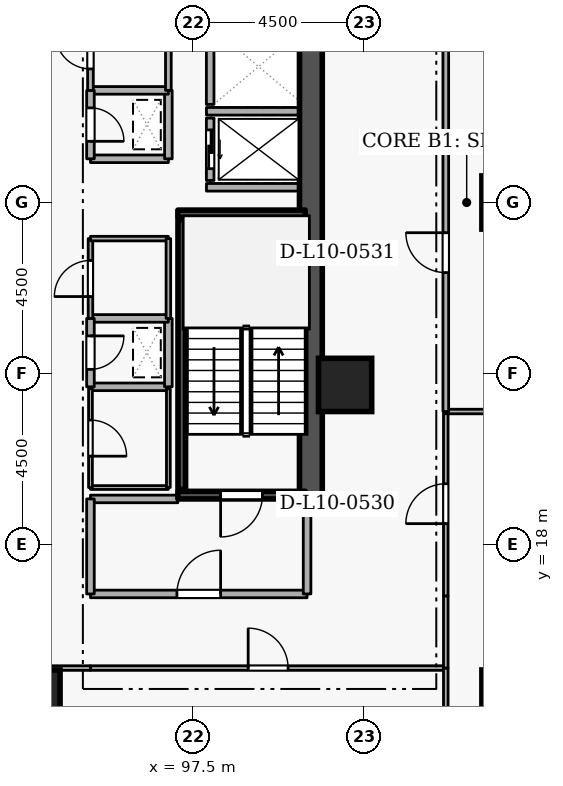
"""IFC4 building model, lengths in metres.
Left out: names, types, materials, properties, quantities, classifications, styles, units other than length and angle.
Written with IfcOpenShell. Run it as: python <this file> out.ifc"""

import sys

from ifc_helpers import new_model, si_unit, direction, frame, frame_2d, origin, origin_2d, place, context, subcontext, project, spatial, rectangle, extrude, element, fill, save


model = new_model("IFC4")
c1 = context("Model", 3, precision=1e-05, world=origin(), true_north=direction((0.0, 1.0)))
c2 = subcontext(c1, "Body", "Model", "MODEL_VIEW")
j1 = project(units=[si_unit("LENGTHUNIT", "METRE"), si_unit("PLANEANGLEUNIT", "RADIAN")], contexts=[c1])
p1 = place(None, origin())
s1 = spatial("IfcSite", under=j1, at=p1, CompositionType="ELEMENT")
p2 = place(p1, origin())
s2 = spatial("IfcBuilding", under=s1, at=p2, CompositionType="ELEMENT")
p3 = place(p2, frame((0.0, 0.0, 42.3)))
s3 = spatial("IfcBuildingStorey", under=s2, at=p3, CompositionType="ELEMENT", Elevation=42.3)
p4 = place(p3, frame((100.6, 19.2, 0.0), z_axis=(0.0, 0.0, 1.0), x_axis=(0.0, 1.0, 0.0)))
e1 = element("IfcWall", 1, at=p4, inside=s3, PredefinedType="SHEAR", context=c2, shape_type="SweptSolid", body=[
    extrude(rectangle(XDim=15.6, YDim=0.6, at=frame_2d((7.8, 0.0))), origin(), (0.0, 0.0, 1.0), 3.6),
])
for number, where, z_axis, x_axis in (
    (2, (105.8, 14.0, 0.0), (0.0, 0.0, 1.0), (1.0, 0.0, 0.0)),
    (3, (105.8, 27.0, 0.0), (0.0, 0.0, 1.0), (1.0, 0.0, 0.0)),
    (4, (93.3, 14.0, 0.0), (0.0, 0.0, 1.0), (1.0, 0.0, 0.0)),
    (5, (101.5, 22.2, 0.0), (0.0, 0.0, 1.0), (1.0, 0.0, 0.0)),
):
    element("IfcColumn", number, at=place(p3, frame(where, z_axis=z_axis, x_axis=x_axis)), inside=s3, PredefinedType="COLUMN", context=c2, shape_type="SweptSolid", body=[
        extrude(rectangle(XDim=1.4, YDim=1.4, at=origin_2d()), origin(), (0.0, 0.0, 1.0), 3.6),
    ])
p5 = place(p3, frame((97.95, 29.22, 0.0), z_axis=(0.0, 0.0, 1.0), x_axis=(0.0, -1.0, 0.0)))
e6 = element("IfcWall", 6, at=p5, inside=s3, PredefinedType="STANDARD", context=c2, shape_type="SweptSolid", body=[
    extrude(rectangle(XDim=1.64, YDim=0.2, at=frame_2d((0.82, 0.0))), origin(), (0.0, 0.0, 1.0), 3.34),
])
p6 = place(p5, frame((0.31, 0.0, 0.0)))
e7 = element("IfcOpeningElement", 7, at=p6, cuts=e6, PredefinedType="OPENING", context=c2, shape_type="SweptSolid", body=[
    extrude(rectangle(XDim=1.02, YDim=2.06, at=frame_2d((0.51, 1.03))), frame((0.0, 0.11, 0.0), z_axis=(0.0, -1.0, 0.0), x_axis=(1.0, 0.0, 0.0)), (0.0, 0.0, 1.0), 0.22),
])
p7 = place(p3, frame((97.95, 31.57, 0.0), z_axis=(0.0, 0.0, 1.0), x_axis=(0.0, -1.0, 0.0)))
e8 = element("IfcWall", 8, at=p7, inside=s3, PredefinedType="STANDARD", context=c2, shape_type="SweptSolid", body=[
    extrude(rectangle(XDim=1.99, YDim=0.2, at=frame_2d((0.995, 0.0))), origin(), (0.0, 0.0, 1.0), 3.34),
])
for number, where, z_axis, x_axis in (
    (9, (97.852, 29.4, 0.0), (0.0, 0.0, 1.0), (1.0, 0.0, 0.0)),
    (10, (97.852, 27.4, 0.0), (0.0, 0.0, 1.0), (1.0, 0.0, 0.0)),
):
    element("IfcWall", number, at=place(p3, frame(where, z_axis=z_axis, x_axis=x_axis)), inside=s3, PredefinedType="STANDARD", context=c2, shape_type="SweptSolid", body=[
        extrude(rectangle(XDim=2.436, YDim=0.2, at=frame_2d((1.218, 0.0))), origin(), (0.0, 0.0, 1.0), 3.34),
    ])
p8 = place(p3, frame((100.45, 19.3, 0.0), z_axis=(0.0, 0.0, 1.0), x_axis=(-1.0, 0.0, 0.0)))
e11 = element("IfcWall", 11, at=p8, inside=s3, PredefinedType="SHEAR", context=c2, shape_type="SweptSolid", body=[
    extrude(rectangle(XDim=3.35, YDim=0.2, at=frame_2d((1.675, 0.0))), origin(), (0.0, 0.0, 1.0), 3.6),
])
p9 = place(p8, frame((1.125, 0.0, 0.0)))
e12 = element("IfcOpeningElement", 12, at=p9, cuts=e11, PredefinedType="OPENING", context=c2, shape_type="SweptSolid", body=[
    extrude(rectangle(XDim=1.1, YDim=2.1, at=frame_2d((0.55, 1.05))), frame((0.0, 0.11, 0.0), z_axis=(0.0, -1.0, 0.0), x_axis=(1.0, 0.0, 0.0)), (0.0, 0.0, 1.0), 0.22),
])
p10 = place(p3, frame((97.1, 26.7, 0.0), z_axis=(0.0, 0.0, 1.0), x_axis=(1.0, 0.0, 0.0)))
e13 = element("IfcWall", 13, at=p10, inside=s3, PredefinedType="SHEAR", context=c2, shape_type="SweptSolid", body=[
    extrude(rectangle(XDim=3.35, YDim=0.2, at=frame_2d((1.675, 0.0))), origin(), (0.0, 0.0, 1.0), 3.6),
])
p11 = place(p3, frame((97.203, 26.55, 0.0), z_axis=(0.0, 0.0, 1.0), x_axis=(0.0, -1.0, 0.0)))
e14 = element("IfcWall", 14, at=p11, inside=s3, PredefinedType="SHEAR", context=c2, shape_type="SweptSolid", body=[
    extrude(rectangle(XDim=7.1, YDim=0.2, at=frame_2d((3.55, 0.0))), origin(), (0.0, 0.0, 1.0), 3.6),
])
p12 = place(p3, frame((94.8, 16.7, 0.0), z_axis=(0.0, 0.0, 1.0), x_axis=(1.0, 0.0, 0.0)))
e15 = element("IfcWall", 15, at=p12, inside=s3, PredefinedType="STANDARD", context=c2, shape_type="SweptSolid", body=[
    extrude(rectangle(XDim=5.7, YDim=0.2, at=frame_2d((2.85, 0.0))), origin(), (0.0, 0.0, 1.0), 3.34),
])
p13 = place(p12, frame((2.275, 0.0, 0.0)))
e16 = element("IfcOpeningElement", 16, at=p13, cuts=e15, PredefinedType="OPENING", context=c2, shape_type="SweptSolid", body=[
    extrude(rectangle(XDim=1.15, YDim=2.1, at=frame_2d((0.575, 1.05))), frame((0.0, 0.11, 0.0), z_axis=(0.0, -1.0, 0.0), x_axis=(1.0, 0.0, 0.0)), (0.0, 0.0, 1.0), 0.22),
])
p14 = place(p3, frame((100.5, 16.7, 0.0), z_axis=(0.0, 0.0, 1.0), x_axis=(0.0, 1.0, 0.0)))
e17 = element("IfcWall", 17, at=p14, inside=s3, PredefinedType="STANDARD", context=c2, shape_type="SweptSolid", body=[
    extrude(rectangle(XDim=2.5, YDim=0.2, at=frame_2d((1.25, 0.0))), origin(), (0.0, 0.0, 1.0), 3.34),
])
p15 = place(p3, frame((97.1, 19.2, 0.0), z_axis=(0.0, 0.0, 1.0), x_axis=(-1.0, 0.0, 0.0)))
e18 = element("IfcWall", 18, at=p15, inside=s3, PredefinedType="STANDARD", context=c2, shape_type="SweptSolid", body=[
    extrude(rectangle(XDim=2.3, YDim=0.2, at=frame_2d((1.15, 0.0))), origin(), (0.0, 0.0, 1.0), 2.545),
])
p16 = place(p3, frame((94.8, 19.2, 0.0), z_axis=(0.0, 0.0, 1.0), x_axis=(0.0, -1.0, 0.0)))
e19 = element("IfcWall", 19, at=p16, inside=s3, PredefinedType="STANDARD", context=c2, shape_type="SweptSolid", body=[
    extrude(rectangle(XDim=2.5, YDim=0.2, at=frame_2d((1.25, 0.0))), origin(), (0.0, 0.0, 1.0), 3.34),
])
p17 = place(p3, frame((94.8, 28.15, 0.0), z_axis=(0.0, 0.0, 1.0), x_axis=(1.0, 0.0, 0.0)))
e20 = element("IfcWall", 20, at=p17, inside=s3, PredefinedType="STANDARD", context=c2, shape_type="SweptSolid", body=[
    extrude(rectangle(XDim=2.05, YDim=0.2, at=frame_2d((1.025, 0.0))), origin(), (0.0, 0.0, 1.0), 3.34),
])
p18 = place(p3, frame((96.85, 28.15, 0.0), z_axis=(0.0, 0.0, 1.0), x_axis=(0.0, 1.0, 0.0)))
e21 = element("IfcWall", 21, at=p18, inside=s3, PredefinedType="STANDARD", context=c2, shape_type="SweptSolid", body=[
    extrude(rectangle(XDim=1.8, YDim=0.2, at=frame_2d((0.9, 0.0))), origin(), (0.0, 0.0, 1.0), 3.34),
])
p19 = place(p3, frame((96.85, 29.95, 0.0), z_axis=(0.0, 0.0, 1.0), x_axis=(-1.0, 0.0, 0.0)))
e22 = element("IfcWall", 22, at=p19, inside=s3, PredefinedType="STANDARD", context=c2, shape_type="SweptSolid", body=[
    extrude(rectangle(XDim=2.05, YDim=0.2, at=frame_2d((1.025, 0.0))), origin(), (0.0, 0.0, 1.0), 3.34),
])
p20 = place(p3, frame((94.8, 29.95, 0.0), z_axis=(0.0, 0.0, 1.0), x_axis=(0.0, -1.0, 0.0)))
e23 = element("IfcWall", 23, at=p20, inside=s3, PredefinedType="STANDARD", context=c2, shape_type="SweptSolid", body=[
    extrude(rectangle(XDim=1.8, YDim=0.2, at=frame_2d((0.9, 0.0))), origin(), (0.0, 0.0, 1.0), 3.34),
])
p21 = place(p20, frame((0.46, 0.0, 0.0)))
e24 = element("IfcOpeningElement", 24, at=p21, cuts=e23, PredefinedType="OPENING", context=c2, shape_type="SweptSolid", body=[
    extrude(rectangle(XDim=0.88, YDim=2.04, at=frame_2d((0.44, 1.02))), frame((0.0, 0.11, 0.0), z_axis=(0.0, -1.0, 0.0), x_axis=(1.0, 0.0, 0.0)), (0.0, 0.0, 1.0), 0.22),
])
p22 = place(p3, frame((94.8, 22.15, 0.0), z_axis=(0.0, 0.0, 1.0), x_axis=(1.0, 0.0, 0.0)))
e25 = element("IfcWall", 25, at=p22, inside=s3, PredefinedType="STANDARD", context=c2, shape_type="SweptSolid", body=[
    extrude(rectangle(XDim=2.05, YDim=0.2, at=frame_2d((1.025, 0.0))), origin(), (0.0, 0.0, 1.0), 3.34),
])
p23 = place(p3, frame((96.85, 22.15, 0.0), z_axis=(0.0, 0.0, 1.0), x_axis=(0.0, 1.0, 0.0)))
e26 = element("IfcWall", 26, at=p23, inside=s3, PredefinedType="STANDARD", context=c2, shape_type="SweptSolid", body=[
    extrude(rectangle(XDim=1.8, YDim=0.2, at=frame_2d((0.9, 0.0))), origin(), (0.0, 0.0, 1.0), 3.34),
])
p24 = place(p3, frame((96.85, 23.95, 0.0), z_axis=(0.0, 0.0, 1.0), x_axis=(-1.0, 0.0, 0.0)))
e27 = element("IfcWall", 27, at=p24, inside=s3, PredefinedType="STANDARD", context=c2, shape_type="SweptSolid", body=[
    extrude(rectangle(XDim=2.05, YDim=0.2, at=frame_2d((1.025, 0.0))), origin(), (0.0, 0.0, 1.0), 3.34),
])
p25 = place(p3, frame((94.8, 23.95, 0.0), z_axis=(0.0, 0.0, 1.0), x_axis=(0.0, -1.0, 0.0)))
e28 = element("IfcWall", 28, at=p25, inside=s3, PredefinedType="STANDARD", context=c2, shape_type="SweptSolid", body=[
    extrude(rectangle(XDim=1.8, YDim=0.2, at=frame_2d((0.9, 0.0))), origin(), (0.0, 0.0, 1.0), 3.34),
])
p26 = place(p25, frame((0.46, 0.0, 0.0)))
e29 = element("IfcOpeningElement", 29, at=p26, cuts=e28, PredefinedType="OPENING", context=c2, shape_type="SweptSolid", body=[
    extrude(rectangle(XDim=0.88, YDim=2.04, at=frame_2d((0.44, 1.02))), frame((0.0, 0.11, 0.0), z_axis=(0.0, -1.0, 0.0), x_axis=(1.0, 0.0, 0.0)), (0.0, 0.0, 1.0), 0.22),
])
p27 = place(p3, frame((94.8, 19.5, 0.0), z_axis=(0.0, 0.0, 1.0), x_axis=(1.0, 0.0, 0.0)))
e30 = element("IfcWall", 30, at=p27, inside=s3, PredefinedType="PARTITIONING", context=c2, shape_type="SweptSolid", body=[
    extrude(rectangle(XDim=2.05, YDim=0.1, at=frame_2d((1.025, 0.0))), origin(), (0.0, 0.0, 1.0), 2.545),
])
p28 = place(p3, frame((96.85, 19.5, 0.0), z_axis=(0.0, 0.0, 1.0), x_axis=(0.0, 1.0, 0.0)))
e31 = element("IfcWall", 31, at=p28, inside=s3, PredefinedType="PARTITIONING", context=c2, shape_type="SweptSolid", body=[
    extrude(rectangle(XDim=2.6, YDim=0.1, at=frame_2d((1.3, 0.0))), origin(), (0.0, 0.0, 1.0), 3.34),
])
p29 = place(p3, frame((94.8, 22.1, 0.0), z_axis=(0.0, 0.0, 1.0), x_axis=(0.0, -1.0, 0.0)))
e32 = element("IfcWall", 32, at=p29, inside=s3, PredefinedType="PARTITIONING", context=c2, shape_type="SweptSolid", body=[
    extrude(rectangle(XDim=2.6, YDim=0.1, at=frame_2d((1.3, 0.0))), origin(), (0.0, 0.0, 1.0), 3.34),
])
p30 = place(p29, frame((0.825, 0.0, 0.0)))
e33 = element("IfcOpeningElement", 33, at=p30, cuts=e32, PredefinedType="OPENING", context=c2, shape_type="SweptSolid", body=[
    extrude(rectangle(XDim=0.95, YDim=2.1, at=frame_2d((0.475, 1.05))), frame((0.0, 0.06, 0.0), z_axis=(0.0, -1.0, 0.0), x_axis=(1.0, 0.0, 0.0)), (0.0, 0.0, 1.0), 0.12),
])
p31 = place(p3, frame((94.8, 23.95, 0.0), z_axis=(0.0, 0.0, 1.0), x_axis=(0.0, 1.0, 0.0)))
e34 = element("IfcWall", 34, at=p31, inside=s3, PredefinedType="PARTITIONING", context=c2, shape_type="SweptSolid", body=[
    extrude(rectangle(XDim=2.1, YDim=0.12, at=frame_2d((1.05, 0.0))), origin(), (0.0, 0.0, 1.0), 3.34),
])
p32 = place(p31, frame((0.575, 0.0, 0.0)))
e35 = element("IfcOpeningElement", 35, at=p32, cuts=e34, PredefinedType="OPENING", context=c2, shape_type="SweptSolid", body=[
    extrude(rectangle(XDim=0.95, YDim=2.1, at=frame_2d((0.475, 1.05))), frame((0.0, 0.07, 0.0), z_axis=(0.0, -1.0, 0.0), x_axis=(1.0, 0.0, 0.0)), (0.0, 0.0, 1.0), 0.14),
])
p33 = place(p3, frame((94.8, 26.05, 0.0), z_axis=(0.0, 0.0, 1.0), x_axis=(1.0, 0.0, 0.0)))
e36 = element("IfcWall", 36, at=p33, inside=s3, PredefinedType="PARTITIONING", context=c2, shape_type="SweptSolid", body=[
    extrude(rectangle(XDim=2.05, YDim=0.12, at=frame_2d((1.025, 0.0))), origin(), (0.0, 0.0, 1.0), 3.34),
])
p34 = place(p3, frame((96.85, 26.05, 0.0), z_axis=(0.0, 0.0, 1.0), x_axis=(0.0, -1.0, 0.0)))
e37 = element("IfcWall", 37, at=p34, inside=s3, PredefinedType="PARTITIONING", context=c2, shape_type="SweptSolid", body=[
    extrude(rectangle(XDim=2.1, YDim=0.12, at=frame_2d((1.05, 0.0))), origin(), (0.0, 0.0, 1.0), 3.34),
])
p35 = place(p3, frame((94.8, 29.95, 0.0), z_axis=(0.0, 0.0, 1.0), x_axis=(0.0, 1.0, 0.0)))
e38 = element("IfcWall", 38, at=p35, inside=s3, PredefinedType="PARTITIONING", context=c2, shape_type="SweptSolid", body=[
    extrude(rectangle(XDim=2.05, YDim=0.15, at=frame_2d((1.025, 0.0))), origin(), (0.0, 0.0, 1.0), 3.34),
])
p36 = place(p35, frame((0.565, 0.0, 0.0)))
e39 = element("IfcOpeningElement", 39, at=p36, cuts=e38, PredefinedType="OPENING", context=c2, shape_type="SweptSolid", body=[
    extrude(rectangle(XDim=0.92, YDim=2.08, at=frame_2d((0.46, 1.04))), frame((0.0, 0.085, 0.0), z_axis=(0.0, -1.0, 0.0), x_axis=(1.0, 0.0, 0.0)), (0.0, 0.0, 1.0), 0.17),
])
p37 = place(p3, frame((96.85, 32.0, 0.0), z_axis=(0.0, 0.0, 1.0), x_axis=(0.0, -1.0, 0.0)))
e40 = element("IfcWall", 40, at=p37, inside=s3, PredefinedType="PARTITIONING", context=c2, shape_type="SweptSolid", body=[
    extrude(rectangle(XDim=2.05, YDim=0.15, at=frame_2d((1.025, 0.0))), origin(), (0.0, 0.0, 1.0), 3.34),
])
p38 = place(p3, frame((92.95, 14.75, 0.0), z_axis=(0.0, 0.0, 1.0), x_axis=(1.0, 0.0, 0.0)))
e41 = element("IfcWall", 41, at=p38, inside=s3, PredefinedType="PARTITIONING", context=c2, shape_type="SweptSolid", body=[
    extrude(rectangle(XDim=1.85, YDim=0.12, at=frame_2d((0.925, 0.0))), origin(), (0.0, 0.0, 1.0), 3.34),
])
p39 = place(p3, frame((94.8, 14.75, 0.0), z_axis=(0.0, 0.0, 1.0), x_axis=(1.0, 0.0, 0.0)))
e42 = element("IfcWall", 42, at=p39, inside=s3, PredefinedType="PARTITIONING", context=c2, shape_type="SweptSolid", body=[
    extrude(rectangle(XDim=9.35, YDim=0.12, at=frame_2d((4.675, 0.0))), origin(), (0.0, 0.0, 1.0), 3.34),
])
p40 = place(p39, frame((4.15, 0.0, 0.0)))
e43 = element("IfcOpeningElement", 43, at=p40, cuts=e42, PredefinedType="OPENING", context=c2, shape_type="SweptSolid", body=[
    extrude(rectangle(XDim=1.05, YDim=2.1, at=frame_2d((0.525, 1.05))), frame((0.0, 0.07, 0.0), z_axis=(0.0, -1.0, 0.0), x_axis=(1.0, 0.0, 0.0)), (0.0, 0.0, 1.0), 0.14),
])
p41 = place(p3, frame((104.15, 14.75, 0.0), z_axis=(0.0, 0.0, 1.0), x_axis=(0.0, -1.0, 0.0)))
e44 = element("IfcWall", 44, at=p41, inside=s3, PredefinedType="PARTITIONING", context=c2, shape_type="SweptSolid", body=[
    extrude(rectangle(XDim=11.97, YDim=0.12, at=frame_2d((5.985, 0.0))), origin(), (0.0, 0.0, 1.0), 3.34),
])
p42 = place(p3, frame((104.15, 14.75, 0.0), z_axis=(0.0, 0.0, 1.0), x_axis=(0.0, 1.0, 0.0)))
e45 = element("IfcWall", 45, at=p42, inside=s3, PredefinedType="PARTITIONING", context=c2, shape_type="SweptSolid", body=[
    extrude(rectangle(XDim=1.9, YDim=0.12, at=frame_2d((0.95, 0.0))), origin(), (0.0, 0.0, 1.0), 3.34),
])
p43 = place(p3, frame((104.15, 16.65, 0.0), z_axis=(0.0, 0.0, 1.0), x_axis=(0.0, 1.0, 0.0)))
e46 = element("IfcWall", 46, at=p43, inside=s3, PredefinedType="PARTITIONING", context=c2, shape_type="SweptSolid", body=[
    extrude(rectangle(XDim=4.85, YDim=0.12, at=frame_2d((2.425, 0.0))), origin(), (0.0, 0.0, 1.0), 3.34),
])
p44 = place(p43, frame((1.9, 0.0, 0.0)))
e47 = element("IfcOpeningElement", 47, at=p44, cuts=e46, PredefinedType="OPENING", context=c2, shape_type="SweptSolid", body=[
    extrude(rectangle(XDim=1.05, YDim=2.1, at=frame_2d((0.525, 1.05))), frame((0.0, 0.07, 0.0), z_axis=(0.0, -1.0, 0.0), x_axis=(1.0, 0.0, 0.0)), (0.0, 0.0, 1.0), 0.14),
])
p45 = place(p3, frame((104.15, 21.5, 0.0), z_axis=(0.0, 0.0, 1.0), x_axis=(1.0, 0.0, 0.0)))
e48 = element("IfcWall", 48, at=p45, inside=s3, PredefinedType="PARTITIONING", context=c2, shape_type="SweptSolid", body=[
    extrude(rectangle(XDim=8.57, YDim=0.12, at=frame_2d((4.285, 0.0))), origin(), (0.0, 0.0, 1.0), 3.34),
])
p46 = place(p3, frame((104.15, 21.5, 0.0), z_axis=(0.0, 0.0, 1.0), x_axis=(0.0, 1.0, 0.0)))
e49 = element("IfcWall", 49, at=p46, inside=s3, PredefinedType="PARTITIONING", context=c2, shape_type="SweptSolid", body=[
    extrude(rectangle(XDim=11.0, YDim=0.15, at=frame_2d((5.5, 0.0))), origin(), (0.0, 0.0, 1.0), 3.34),
])
p47 = place(p46, frame((3.655, 0.0, 0.0)))
e50 = element("IfcOpeningElement", 50, at=p47, cuts=e49, PredefinedType="OPENING", context=c2, shape_type="SweptSolid", body=[
    extrude(rectangle(XDim=1.05, YDim=2.1, at=frame_2d((0.525, 1.05))), frame((0.0, 0.085, 0.0), z_axis=(0.0, -1.0, 0.0), x_axis=(1.0, 0.0, 0.0)), (0.0, 0.0, 1.0), 0.17),
])
p48 = place(p6, origin())
e51 = element("IfcDoor", 51, at=p48, inside=s3, OperationType="SLIDING_TO_LEFT", PredefinedType="DOOR", context=c2, shape_type="SweptSolid", body=[
    extrude(rectangle(XDim=1.02, YDim=2.06, at=frame_2d((0.51, 1.03))), frame((0.0, 0.025, 0.0), z_axis=(0.0, -1.0, 0.0), x_axis=(1.0, 0.0, 0.0)), (0.0, 0.0, 1.0), 0.05),
])
fill(e7, e51)
p49 = place(p9, origin())
e52 = element("IfcDoor", 52, at=p49, inside=s3, OperationType="SINGLE_SWING_RIGHT", PredefinedType="DOOR", context=c2, shape_type="SweptSolid", body=[
    extrude(rectangle(XDim=1.1, YDim=2.1, at=frame_2d((0.55, 1.05))), frame((0.0, 0.025, 0.0), z_axis=(0.0, -1.0, 0.0), x_axis=(1.0, 0.0, 0.0)), (0.0, 0.0, 1.0), 0.05),
])
fill(e12, e52)
p50 = place(p13, origin())
e53 = element("IfcDoor", 53, at=p50, inside=s3, OperationType="SINGLE_SWING_RIGHT", PredefinedType="DOOR", context=c2, shape_type="SweptSolid", body=[
    extrude(rectangle(XDim=1.15, YDim=2.1, at=frame_2d((0.575, 1.05))), frame((0.0, 0.025, 0.0), z_axis=(0.0, -1.0, 0.0), x_axis=(1.0, 0.0, 0.0)), (0.0, 0.0, 1.0), 0.05),
])
fill(e16, e53)
p51 = place(p21, origin())
e54 = element("IfcDoor", 54, at=p51, inside=s3, OperationType="SINGLE_SWING_RIGHT", PredefinedType="DOOR", context=c2, shape_type="SweptSolid", body=[
    extrude(rectangle(XDim=0.88, YDim=2.04, at=frame_2d((0.44, 1.02))), frame((0.0, 0.025, 0.0), z_axis=(0.0, -1.0, 0.0), x_axis=(1.0, 0.0, 0.0)), (0.0, 0.0, 1.0), 0.05),
])
fill(e24, e54)
p52 = place(p26, origin())
e55 = element("IfcDoor", 55, at=p52, inside=s3, OperationType="SINGLE_SWING_LEFT", PredefinedType="DOOR", context=c2, shape_type="SweptSolid", body=[
    extrude(rectangle(XDim=0.88, YDim=2.04, at=frame_2d((0.44, 1.02))), frame((0.0, 0.025, 0.0), z_axis=(0.0, -1.0, 0.0), x_axis=(1.0, 0.0, 0.0)), (0.0, 0.0, 1.0), 0.05),
])
fill(e29, e55)
p53 = place(p30, origin())
e56 = element("IfcDoor", 56, at=p53, inside=s3, OperationType="SINGLE_SWING_RIGHT", PredefinedType="DOOR", context=c2, shape_type="SweptSolid", body=[
    extrude(rectangle(XDim=0.95, YDim=2.1, at=frame_2d((0.475, 1.05))), frame((0.0, 0.025, 0.0), z_axis=(0.0, -1.0, 0.0), x_axis=(1.0, 0.0, 0.0)), (0.0, 0.0, 1.0), 0.05),
])
fill(e33, e56)
p54 = place(p32, origin())
e57 = element("IfcDoor", 57, at=p54, inside=s3, OperationType="SINGLE_SWING_LEFT", PredefinedType="DOOR", context=c2, shape_type="SweptSolid", body=[
    extrude(rectangle(XDim=0.95, YDim=2.1, at=frame_2d((0.475, 1.05))), frame((0.0, 0.025, 0.0), z_axis=(0.0, -1.0, 0.0), x_axis=(1.0, 0.0, 0.0)), (0.0, 0.0, 1.0), 0.05),
])
fill(e35, e57)
p55 = place(p36, origin())
e58 = element("IfcDoor", 58, at=p55, inside=s3, OperationType="SINGLE_SWING_RIGHT", PredefinedType="DOOR", context=c2, shape_type="SweptSolid", body=[
    extrude(rectangle(XDim=0.92, YDim=2.08, at=frame_2d((0.46, 1.04))), frame((0.0, 0.025, 0.0), z_axis=(0.0, -1.0, 0.0), x_axis=(1.0, 0.0, 0.0)), (0.0, 0.0, 1.0), 0.05),
])
fill(e39, e58)
p56 = place(p40, origin())
e59 = element("IfcDoor", 59, at=p56, inside=s3, OperationType="SINGLE_SWING_LEFT", PredefinedType="DOOR", context=c2, shape_type="SweptSolid", body=[
    extrude(rectangle(XDim=1.05, YDim=2.1, at=frame_2d((0.525, 1.05))), frame((0.0, 0.025, 0.0), z_axis=(0.0, -1.0, 0.0), x_axis=(1.0, 0.0, 0.0)), (0.0, 0.0, 1.0), 0.05),
])
fill(e43, e59)
p57 = place(p44, origin())
e60 = element("IfcDoor", 60, at=p57, inside=s3, OperationType="SINGLE_SWING_LEFT", PredefinedType="DOOR", context=c2, shape_type="SweptSolid", body=[
    extrude(rectangle(XDim=1.05, YDim=2.1, at=frame_2d((0.525, 1.05))), frame((0.0, 0.025, 0.0), z_axis=(0.0, -1.0, 0.0), x_axis=(1.0, 0.0, 0.0)), (0.0, 0.0, 1.0), 0.05),
])
fill(e47, e60)
p58 = place(p47, origin())
e61 = element("IfcDoor", 61, at=p58, inside=s3, OperationType="SINGLE_SWING_RIGHT", PredefinedType="DOOR", context=c2, shape_type="SweptSolid", body=[
    extrude(rectangle(XDim=1.05, YDim=2.1, at=frame_2d((0.525, 1.05))), frame((0.0, 0.025, 0.0), z_axis=(0.0, -1.0, 0.0), x_axis=(1.0, 0.0, 0.0)), (0.0, 0.0, 1.0), 0.05),
])
fill(e50, e61)
save(model, sys.argv[1])
